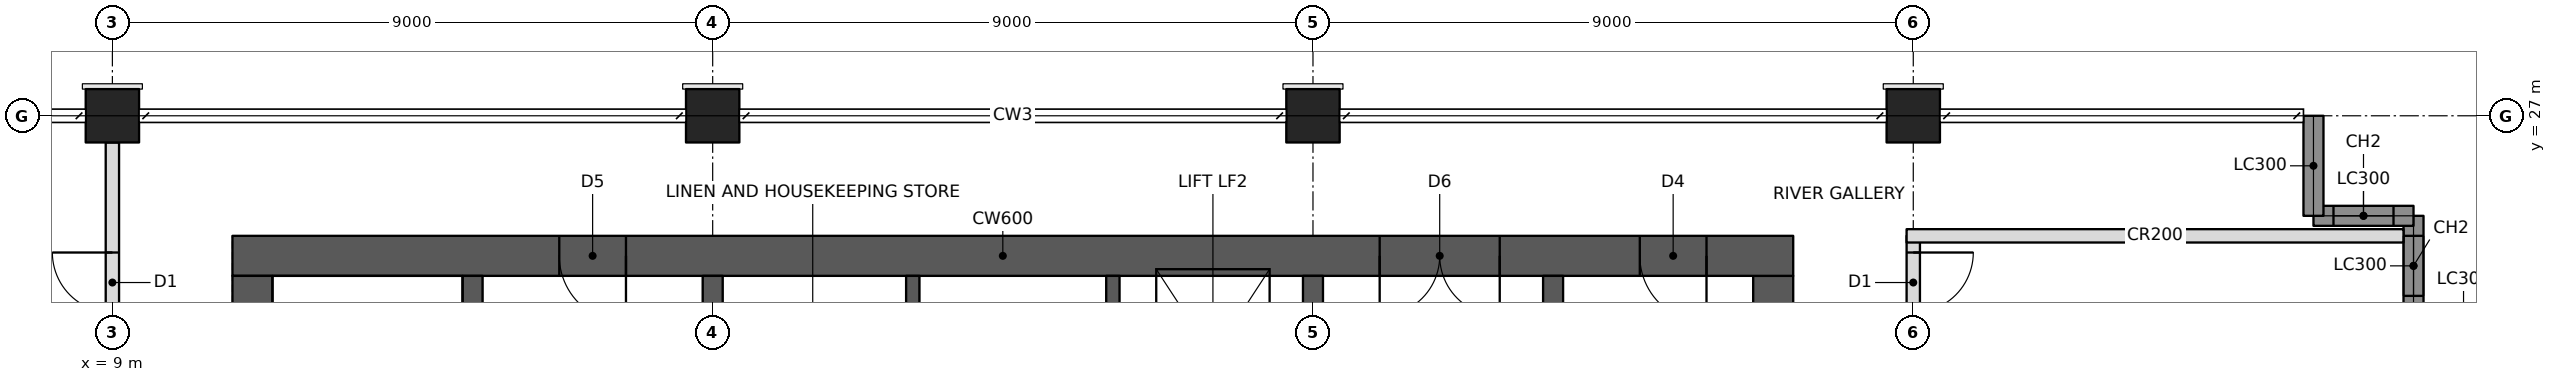
"""IFC4 building model, lengths in metres.
Left out: names, types, materials, properties, quantities, classifications, styles, units other than length and angle.
Written with IfcOpenShell. Run it as: python <this file> out.ifc"""

import sys

from ifc_helpers import new_model, si_unit, direction, frame, frame_2d, origin, origin_2d, place, context, subcontext, project, spatial, rectangle, hollow_rectangle, extrude, element, fill, save


model = new_model("IFC4")
c1 = context("Model", 3, precision=1e-05, world=origin(), true_north=direction((0.0, 1.0)))
c2 = subcontext(c1, "Body", "Model", "MODEL_VIEW")
j1 = project(units=[si_unit("LENGTHUNIT", "METRE"), si_unit("PLANEANGLEUNIT", "RADIAN")], contexts=[c1])
p1 = place(None, origin())
s1 = spatial("IfcSite", under=j1, at=p1, CompositionType="ELEMENT")
p2 = place(p1, origin())
s2 = spatial("IfcBuilding", under=s1, at=p2, CompositionType="ELEMENT")
p3 = place(p2, frame((0.0, 0.0, 184.2)))
s3 = spatial("IfcBuildingStorey", under=s2, at=p3, CompositionType="ELEMENT", Elevation=184.2)
for number, where, z_axis, x_axis in (
    (1, (9.0, 27.0, 0.0), (0.0, 0.0, 1.0), (1.0, 0.0, 0.0)),
    (2, (18.0, 27.0, 0.0), (0.0, 0.0, 1.0), (1.0, 0.0, 0.0)),
    (3, (27.0, 27.0, 0.0), (0.0, 0.0, 1.0), (1.0, 0.0, 0.0)),
    (4, (36.0, 27.0, 0.0), (0.0, 0.0, 1.0), (1.0, 0.0, 0.0)),
):
    element("IfcColumn", number, at=place(p3, frame(where, z_axis=z_axis, x_axis=x_axis)), inside=s3, PredefinedType="COLUMN", context=c2, shape_type="SweptSolid", body=[
        extrude(hollow_rectangle(XDim=0.8, YDim=0.8, WallThickness=0.07, at=origin_2d()), origin(), (0.0, 0.0, 1.0), 3.4),
    ])
p4 = place(p3, frame((10.8, 24.9, 0.0), z_axis=(0.0, 0.0, 1.0), x_axis=(1.0, 0.0, 0.0)))
e5 = element("IfcWall", 5, at=p4, inside=s3, PredefinedType="SHEAR", context=c2, shape_type="SweptSolid", body=[
    extrude(rectangle(XDim=23.4, YDim=0.6, at=frame_2d((11.7, 0.0))), origin(), (0.0, 0.0, 1.0), 3.4),
])
p5 = place(p4, frame((17.2, 0.0, 0.0)))
e6 = element("IfcOpeningElement", 6, at=p5, cuts=e5, PredefinedType="OPENING", context=c2, shape_type="SweptSolid", body=[
    extrude(rectangle(XDim=1.8, YDim=2.1, at=frame_2d((0.9, 1.05))), frame((0.0, 0.31, 0.0), z_axis=(0.0, -1.0, 0.0), x_axis=(1.0, 0.0, 0.0)), (0.0, 0.0, 1.0), 0.62),
])
p6 = place(p4, frame((21.1, 0.0, 0.0)))
e7 = element("IfcOpeningElement", 7, at=p6, cuts=e5, PredefinedType="OPENING", context=c2, shape_type="SweptSolid", body=[
    extrude(rectangle(XDim=1.0, YDim=2.1, at=frame_2d((0.5, 1.05))), frame((0.0, 0.31, 0.0), z_axis=(0.0, -1.0, 0.0), x_axis=(1.0, 0.0, 0.0)), (0.0, 0.0, 1.0), 0.62),
])
p7 = place(p4, frame((4.9, 0.0, 0.0)))
e8 = element("IfcOpeningElement", 8, at=p7, cuts=e5, PredefinedType="OPENING", context=c2, shape_type="SweptSolid", body=[
    extrude(rectangle(XDim=1.0, YDim=2.1, at=frame_2d((0.5, 1.05))), frame((0.0, 0.31, 0.0), z_axis=(0.0, -1.0, 0.0), x_axis=(1.0, 0.0, 0.0)), (0.0, 0.0, 1.0), 0.62),
])
for number, where, z_axis, x_axis in (
    (9, (11.1, 11.4, 0.0), (0.0, 0.0, 1.0), (0.0, 1.0, 0.0)),
    (10, (33.9, 11.4, 0.0), (0.0, 0.0, 1.0), (0.0, 1.0, 0.0)),
):
    element("IfcWall", number, at=place(p3, frame(where, z_axis=z_axis, x_axis=x_axis)), inside=s3, PredefinedType="SHEAR", context=c2, shape_type="SweptSolid", body=[
        extrude(rectangle(XDim=13.2, YDim=0.6, at=frame_2d((6.6, 0.0))), origin(), (0.0, 0.0, 1.0), 3.4),
    ])
p8 = place(p3, frame((14.4, 11.4, 0.0), z_axis=(0.0, 0.0, 1.0), x_axis=(0.0, 1.0, 0.0)))
e11 = element("IfcWall", 11, at=p8, inside=s3, PredefinedType="SHEAR", context=c2, shape_type="SweptSolid", body=[
    extrude(rectangle(XDim=13.2, YDim=0.3, at=frame_2d((6.6, 0.0))), origin(), (0.0, 0.0, 1.0), 3.4),
])
p9 = place(p3, frame((18.0, 11.4, 0.0), z_axis=(0.0, 0.0, 1.0), x_axis=(0.0, 1.0, 0.0)))
e12 = element("IfcWall", 12, at=p9, inside=s3, PredefinedType="SHEAR", context=c2, shape_type="SweptSolid", body=[
    extrude(rectangle(XDim=13.2, YDim=0.3, at=frame_2d((6.6, 0.0))), origin(), (0.0, 0.0, 1.0), 3.4),
])
p10 = place(p9, frame((3.6, 0.0, 0.0)))
e13 = element("IfcOpeningElement", 13, at=p10, cuts=e12, PredefinedType="OPENING", context=c2, shape_type="SweptSolid", body=[
    extrude(rectangle(XDim=1.0, YDim=2.1, at=frame_2d((0.5, 1.05))), frame((0.0, 0.16, 0.0), z_axis=(0.0, -1.0, 0.0), x_axis=(1.0, 0.0, 0.0)), (0.0, 0.0, 1.0), 0.32),
])
p11 = place(p9, frame((7.85, 0.0, 0.0)))
e14 = element("IfcOpeningElement", 14, at=p11, cuts=e12, PredefinedType="OPENING", context=c2, shape_type="SweptSolid", body=[
    extrude(rectangle(XDim=1.1, YDim=2.1, at=frame_2d((0.55, 1.05))), frame((0.0, 0.16, 0.0), z_axis=(0.0, -1.0, 0.0), x_axis=(1.0, 0.0, 0.0)), (0.0, 0.0, 1.0), 0.32),
])
p12 = place(p3, frame((27.0, 21.75, 0.0), z_axis=(0.0, 0.0, 1.0), x_axis=(0.0, 1.0, 0.0)))
e15 = element("IfcWall", 15, at=p12, inside=s3, PredefinedType="SHEAR", context=c2, shape_type="SweptSolid", body=[
    extrude(rectangle(XDim=2.85, YDim=0.3, at=frame_2d((1.425, 0.0))), origin(), (0.0, 0.0, 1.0), 3.4),
])
for number, where, z_axis, x_axis in (
    (16, (21.0, 21.75, 0.0), (0.0, 0.0, 1.0), (0.0, 1.0, 0.0)),
    (17, (24.0, 21.75, 0.0), (0.0, 0.0, 1.0), (0.0, 1.0, 0.0)),
):
    element("IfcWall", number, at=place(p3, frame(where, z_axis=z_axis, x_axis=x_axis)), inside=s3, PredefinedType="SHEAR", context=c2, shape_type="SweptSolid", body=[
        extrude(rectangle(XDim=2.85, YDim=0.2, at=frame_2d((1.425, 0.0))), origin(), (0.0, 0.0, 1.0), 3.4),
    ])
p13 = place(p3, frame((30.6, 11.4, 0.0), z_axis=(0.0, 0.0, 1.0), x_axis=(0.0, 1.0, 0.0)))
e18 = element("IfcWall", 18, at=p13, inside=s3, PredefinedType="SHEAR", context=c2, shape_type="SweptSolid", body=[
    extrude(rectangle(XDim=13.2, YDim=0.3, at=frame_2d((6.6, 0.0))), origin(), (0.0, 0.0, 1.0), 3.4),
])
p14 = place(p3, frame((43.5, 24.0, 0.0), z_axis=(0.0, 0.0, 1.0), x_axis=(0.0, 1.0, 0.0)))
e19 = element("IfcWall", 19, at=p14, inside=s3, PredefinedType="SOLIDWALL", context=c2, shape_type="SweptSolid", body=[
    extrude(rectangle(XDim=1.5, YDim=0.3, at=frame_2d((0.75, 0.0))), origin(), (0.0, 0.0, 1.0), 3.2),
])
p15 = place(p14, frame((0.3, 0.0, 0.6)))
e20 = element("IfcOpeningElement", 20, at=p15, cuts=e19, PredefinedType="OPENING", context=c2, shape_type="SweptSolid", body=[
    extrude(rectangle(XDim=0.9, YDim=2.2, at=frame_2d((0.45, 1.1))), frame((0.0, 0.16, 0.0), z_axis=(0.0, -1.0, 0.0), x_axis=(1.0, 0.0, 0.0)), (0.0, 0.0, 1.0), 0.32),
])
p16 = place(p3, frame((43.5, 25.5, 0.0), z_axis=(0.0, 0.0, 1.0), x_axis=(-1.0, 0.0, 0.0)))
e21 = element("IfcWall", 21, at=p16, inside=s3, PredefinedType="SOLIDWALL", context=c2, shape_type="SweptSolid", body=[
    extrude(rectangle(XDim=1.5, YDim=0.3, at=frame_2d((0.75, 0.0))), origin(), (0.0, 0.0, 1.0), 3.2),
])
p17 = place(p16, frame((0.3, 0.0, 0.6)))
e22 = element("IfcOpeningElement", 22, at=p17, cuts=e21, PredefinedType="OPENING", context=c2, shape_type="SweptSolid", body=[
    extrude(rectangle(XDim=0.9, YDim=2.2, at=frame_2d((0.45, 1.1))), frame((0.0, 0.16, 0.0), z_axis=(0.0, -1.0, 0.0), x_axis=(1.0, 0.0, 0.0)), (0.0, 0.0, 1.0), 0.32),
])
p18 = place(p3, frame((42.0, 25.5, 0.0), z_axis=(0.0, 0.0, 1.0), x_axis=(0.0, 1.0, 0.0)))
e23 = element("IfcWall", 23, at=p18, inside=s3, PredefinedType="SOLIDWALL", context=c2, shape_type="SweptSolid", body=[
    extrude(rectangle(XDim=1.5, YDim=0.3, at=frame_2d((0.75, 0.0))), origin(), (0.0, 0.0, 1.0), 2.42),
])
p19 = place(p3, frame((9.0, 18.4, 0.0), z_axis=(0.0, 0.0, 1.0), x_axis=(0.0, 1.0, 0.0)))
e24 = element("IfcWall", 24, at=p19, inside=s3, PredefinedType="PARTITIONING", context=c2, shape_type="SweptSolid", body=[
    extrude(rectangle(XDim=8.2, YDim=0.2, at=frame_2d((4.1, 0.0))), origin(), (0.0, 0.0, 1.0), 2.405),
])
p20 = place(p19, frame((5.65, 0.0, 0.0)))
e25 = element("IfcOpeningElement", 25, at=p20, cuts=e24, PredefinedType="OPENING", context=c2, shape_type="SweptSolid", body=[
    extrude(rectangle(XDim=0.9, YDim=2.1, at=frame_2d((0.45, 1.05))), frame((0.0, 0.11, 0.0), z_axis=(0.0, -1.0, 0.0), x_axis=(1.0, 0.0, 0.0)), (0.0, 0.0, 1.0), 0.22),
])
p21 = place(p3, frame((36.0, 18.4, 0.0), z_axis=(0.0, 0.0, 1.0), x_axis=(0.0, 1.0, 0.0)))
e26 = element("IfcWall", 26, at=p21, inside=s3, PredefinedType="PARTITIONING", context=c2, shape_type="SweptSolid", body=[
    extrude(rectangle(XDim=6.8, YDim=0.2, at=frame_2d((3.4, 0.0))), origin(), (0.0, 0.0, 1.0), 2.405),
])
p22 = place(p21, frame((5.65, 0.0, 0.0)))
e27 = element("IfcOpeningElement", 27, at=p22, cuts=e26, PredefinedType="OPENING", context=c2, shape_type="SweptSolid", body=[
    extrude(rectangle(XDim=0.9, YDim=2.1, at=frame_2d((0.45, 1.05))), frame((0.0, 0.11, 0.0), z_axis=(0.0, -1.0, 0.0), x_axis=(1.0, 0.0, 0.0)), (0.0, 0.0, 1.0), 0.22),
])
p23 = place(p3, frame((35.9, 25.2, 0.0), z_axis=(0.0, 0.0, 1.0), x_axis=(1.0, 0.0, 0.0)))
e28 = element("IfcWall", 28, at=p23, inside=s3, PredefinedType="PARTITIONING", context=c2, shape_type="SweptSolid", body=[
    extrude(rectangle(XDim=7.45, YDim=0.2, at=frame_2d((3.725, 0.0))), origin(), (0.0, 0.0, 1.0), 2.404),
])
p24 = place(p15, origin())
e29 = element("IfcWindow", 29, at=p24, inside=s3, PartitioningType="SINGLE_PANEL", PredefinedType="WINDOW", context=c2, shape_type="SweptSolid", body=[
    extrude(rectangle(XDim=0.9, YDim=2.2, at=frame_2d((0.45, 1.1))), frame((0.0, 0.03, 0.0), z_axis=(0.0, -1.0, 0.0), x_axis=(1.0, 0.0, 0.0)), (0.0, 0.0, 1.0), 0.06),
])
fill(e20, e29)
p25 = place(p17, origin())
e30 = element("IfcWindow", 30, at=p25, inside=s3, PartitioningType="SINGLE_PANEL", PredefinedType="WINDOW", context=c2, shape_type="SweptSolid", body=[
    extrude(rectangle(XDim=0.9, YDim=2.2, at=frame_2d((0.45, 1.1))), frame((0.0, 0.03, 0.0), z_axis=(0.0, -1.0, 0.0), x_axis=(1.0, 0.0, 0.0)), (0.0, 0.0, 1.0), 0.06),
])
fill(e22, e30)
p26 = place(p20, origin())
e31 = element("IfcDoor", 31, at=p26, inside=s3, OperationType="SINGLE_SWING_RIGHT", PredefinedType="DOOR", context=c2, shape_type="SweptSolid", body=[
    extrude(rectangle(XDim=0.9, YDim=2.1, at=frame_2d((0.45, 1.05))), frame((0.0, 0.025, 0.0), z_axis=(0.0, -1.0, 0.0), x_axis=(1.0, 0.0, 0.0)), (0.0, 0.0, 1.0), 0.05),
])
fill(e25, e31)
p27 = place(p22, frame((0.9, 0.0, 0.0), z_axis=(0.0, 0.0, 1.0), x_axis=(-1.0, 0.0, 0.0)))
e32 = element("IfcDoor", 32, at=p27, inside=s3, OperationType="SINGLE_SWING_LEFT", PredefinedType="DOOR", context=c2, shape_type="SweptSolid", body=[
    extrude(rectangle(XDim=0.9, YDim=2.1, at=frame_2d((0.45, 1.05))), frame((0.0, 0.025, 0.0), z_axis=(0.0, -1.0, 0.0), x_axis=(1.0, 0.0, 0.0)), (0.0, 0.0, 1.0), 0.05),
])
fill(e27, e32)
p28 = place(p5, frame((1.8, 0.0, 0.0), z_axis=(0.0, 0.0, 1.0), x_axis=(-1.0, 0.0, 0.0)))
e33 = element("IfcDoor", 33, at=p28, inside=s3, OperationType="DOUBLE_DOOR_SINGLE_SWING", PredefinedType="DOOR", context=c2, shape_type="SweptSolid", body=[
    extrude(rectangle(XDim=1.8, YDim=2.1, at=frame_2d((0.9, 1.05))), frame((0.0, 0.025, 0.0), z_axis=(0.0, -1.0, 0.0), x_axis=(1.0, 0.0, 0.0)), (0.0, 0.0, 1.0), 0.05),
])
fill(e6, e33)
p29 = place(p6, frame((1.0, 0.0, 0.0), z_axis=(0.0, 0.0, 1.0), x_axis=(-1.0, 0.0, 0.0)))
e34 = element("IfcDoor", 34, at=p29, inside=s3, OperationType="SINGLE_SWING_LEFT", PredefinedType="DOOR", context=c2, shape_type="SweptSolid", body=[
    extrude(rectangle(XDim=1.0, YDim=2.1, at=frame_2d((0.5, 1.05))), frame((0.0, 0.025, 0.0), z_axis=(0.0, -1.0, 0.0), x_axis=(1.0, 0.0, 0.0)), (0.0, 0.0, 1.0), 0.05),
])
fill(e7, e34)
p30 = place(p7, frame((1.0, 0.0, 0.0), z_axis=(0.0, 0.0, 1.0), x_axis=(-1.0, 0.0, 0.0)))
e35 = element("IfcDoor", 35, at=p30, inside=s3, OperationType="SINGLE_SWING_LEFT", PredefinedType="DOOR", context=c2, shape_type="SweptSolid", body=[
    extrude(rectangle(XDim=1.0, YDim=2.1, at=frame_2d((0.5, 1.05))), frame((0.0, 0.025, 0.0), z_axis=(0.0, -1.0, 0.0), x_axis=(1.0, 0.0, 0.0)), (0.0, 0.0, 1.0), 0.05),
])
fill(e8, e35)
save(model, sys.argv[1])
